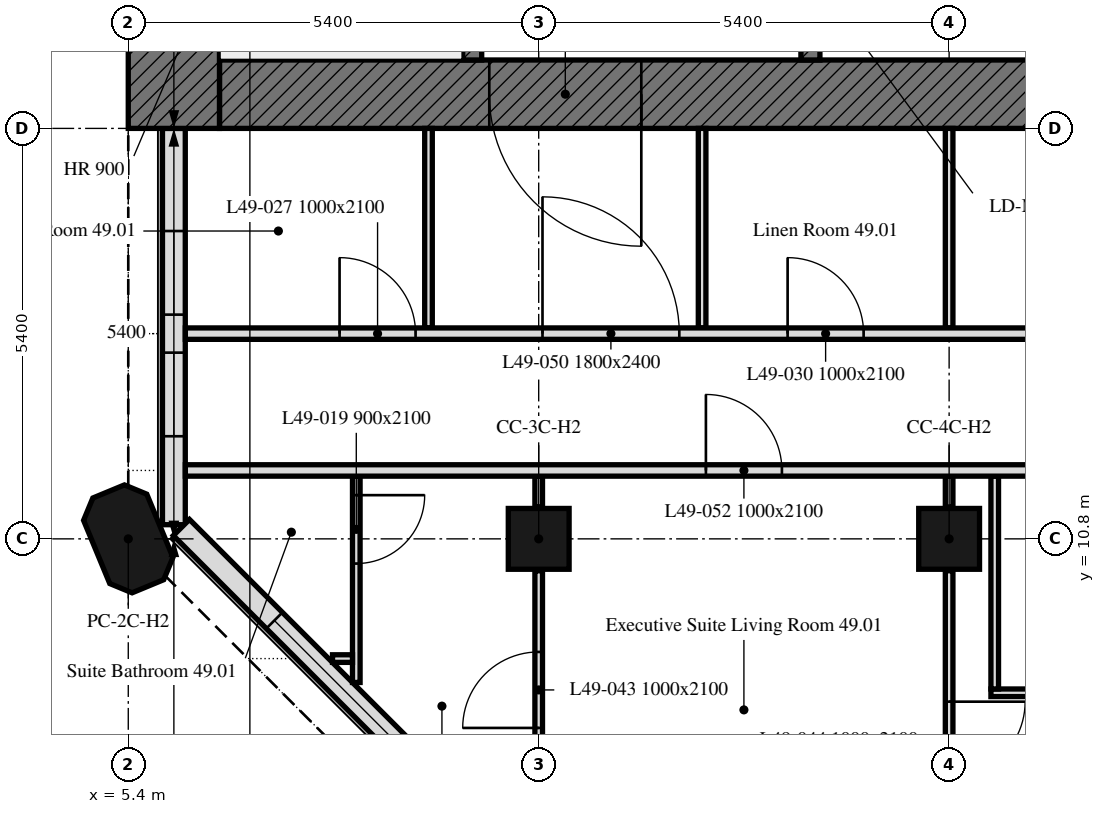
"""IFC4 building model, lengths in metres.
Left out: names, types, materials, properties, quantities, classifications, styles, units other than length and angle.
Written with IfcOpenShell. Run it as: python <this file> out.ifc"""

import sys

from ifc_helpers import new_model, si_unit, direction, frame, frame_2d, origin, origin_2d, place, context, subcontext, project, spatial, polyline, rectangle, outline, extrude, element, fill, save


model = new_model("IFC4")
c1 = context("Model", 3, precision=1e-05, world=origin(), true_north=direction((0.0, 1.0)))
c2 = subcontext(c1, "Body", "Model", "MODEL_VIEW")
j1 = project(units=[si_unit("LENGTHUNIT", "METRE"), si_unit("PLANEANGLEUNIT", "RADIAN")], contexts=[c1])
p1 = place(None, origin())
s1 = spatial("IfcSite", under=j1, at=p1, CompositionType="ELEMENT")
p2 = place(p1, origin())
s2 = spatial("IfcBuilding", under=s1, at=p2, CompositionType="ELEMENT")
p3 = place(p2, frame((0.0, 0.0, 200.5)))
s3 = spatial("IfcBuildingStorey", under=s2, at=p3, CompositionType="ELEMENT", Elevation=200.5)
p4 = place(p3, frame((5.4, 10.8, 0.0), z_axis=(0.0, 0.0, 1.0), x_axis=(-0.382683432365, 0.923879532511, 0.0)))
e1 = element("IfcColumn", 1, at=p4, inside=s3, PredefinedType="COLUMN", context=c2, shape_type="SweptSolid", body=[
    extrude(outline(polyline([(-0.45, -0.45), (0.45, -0.45), (0.675, -0.225), (0.675, 0.225), (0.45, 0.45), (-0.45, 0.45), (-0.675, 0.225), (-0.675, -0.225), (-0.45, -0.45)])), origin(), (0.0, 0.0, 1.0), 3.0),
])
for number, where, z_axis, x_axis in (
    (2, (10.8, 10.8, 0.0), (0.0, 0.0, 1.0), (1.0, 0.0, 0.0)),
    (3, (16.2, 10.8, 0.0), (0.0, 0.0, 1.0), (1.0, 0.0, 0.0)),
):
    element("IfcColumn", number, at=place(p3, frame(where, z_axis=z_axis, x_axis=x_axis)), inside=s3, PredefinedType="COLUMN", context=c2, shape_type="SweptSolid", body=[
        extrude(rectangle(XDim=0.8, YDim=0.8, at=origin_2d()), origin(), (0.0, 0.0, 1.0), 3.0),
    ])
p5 = place(p3, frame((6.0, 16.2, 0.0), z_axis=(0.0, 0.0, 1.0), x_axis=(0.0, -1.0, 0.0)))
e4 = element("IfcWall", 4, at=p5, inside=s3, PredefinedType="SOLIDWALL", context=c2, shape_type="SweptSolid", body=[
    extrude(rectangle(XDim=5.214, YDim=0.3, at=frame_2d((2.607, 0.0))), origin(), (0.0, 0.0, 1.0), 3.0),
])
p6 = place(p5, frame((1.35, 0.0, 0.9)))
e5 = element("IfcOpeningElement", 5, at=p6, cuts=e4, PredefinedType="OPENING", context=c2, shape_type="SweptSolid", body=[
    extrude(rectangle(XDim=1.1, YDim=1.7, at=frame_2d((0.55, 0.85))), frame((0.0, 0.16, 0.0), z_axis=(0.0, -1.0, 0.0), x_axis=(1.0, 0.0, 0.0)), (0.0, 0.0, 1.0), 0.32),
])
p7 = place(p5, frame((2.95, 0.0, 0.9)))
e6 = element("IfcOpeningElement", 6, at=p7, cuts=e4, PredefinedType="OPENING", context=c2, shape_type="SweptSolid", body=[
    extrude(rectangle(XDim=1.1, YDim=1.7, at=frame_2d((0.55, 0.85))), frame((0.0, 0.16, 0.0), z_axis=(0.0, -1.0, 0.0), x_axis=(1.0, 0.0, 0.0)), (0.0, 0.0, 1.0), 0.32),
])
p8 = place(p3, frame((6.099, 10.949, 0.0), z_axis=(0.0, 0.0, 1.0), x_axis=(0.707106781187, -0.707106781187, 0.0)))
e7 = element("IfcWall", 7, at=p8, inside=s3, PredefinedType="SOLIDWALL", context=c2, shape_type="SweptSolid", body=[
    extrude(rectangle(XDim=6.86, YDim=0.3, at=frame_2d((3.43, 0.0))), origin(), (0.0, 0.0, 1.0), 3.0),
])
p9 = place(p8, frame((1.73, 0.0, 0.9)))
e8 = element("IfcOpeningElement", 8, at=p9, cuts=e7, PredefinedType="OPENING", context=c2, shape_type="SweptSolid", body=[
    extrude(rectangle(XDim=3.4, YDim=1.7, at=frame_2d((1.7, 0.85))), frame((0.0, 0.16, 0.0), z_axis=(0.0, -1.0, 0.0), x_axis=(1.0, 0.0, 0.0)), (0.0, 0.0, 1.0), 0.32),
])
p10 = place(p3, frame((17.7, 16.65, 0.0), z_axis=(0.0, 0.0, 1.0), x_axis=(-1.0, 0.0, 0.0)))
e9 = element("IfcWall", 9, at=p10, inside=s3, PredefinedType="SOLIDWALL", context=c2, shape_type="SweptSolid", body=[
    extrude(rectangle(XDim=11.1, YDim=0.9, at=frame_2d((5.55, 0.0))), origin(), (0.0, 0.0, 1.0), 3.0),
])
p11 = place(p10, frame((5.55, 0.0, 0.0)))
e10 = element("IfcOpeningElement", 10, at=p11, cuts=e9, PredefinedType="OPENING", context=c2, shape_type="SweptSolid", body=[
    extrude(rectangle(XDim=2.0, YDim=2.4, at=frame_2d((1.0, 1.2))), frame((0.0, 0.45, 0.0), z_axis=(0.0, -1.0, 0.0), x_axis=(1.0, 0.0, 0.0)), (0.0, 0.0, 1.0), 0.9),
])
p12 = place(p3, frame((6.0, 16.2, 0.0), z_axis=(0.0, 0.0, 1.0), x_axis=(0.0, 1.0, 0.0)))
e11 = element("IfcWall", 11, at=p12, inside=s3, PredefinedType="SOLIDWALL", context=c2, shape_type="SweptSolid", body=[
    extrude(rectangle(XDim=16.2, YDim=1.2, at=frame_2d((8.1, 0.0))), origin(), (0.0, 0.0, 1.0), 3.0),
])
p13 = place(p3, frame((9.925, 17.1, 0.0), z_axis=(0.0, 0.0, 1.0), x_axis=(0.0, 1.0, 0.0)))
e12 = element("IfcWall", 12, at=p13, inside=s3, PredefinedType="SOLIDWALL", context=c2, shape_type="SweptSolid", body=[
    extrude(rectangle(XDim=14.4, YDim=0.25, at=frame_2d((7.2, 0.0))), origin(), (0.0, 0.0, 1.0), 3.0),
])
p14 = place(p13, frame((4.6, 0.0, 0.0)))
e13 = element("IfcOpeningElement", 13, at=p14, cuts=e12, PredefinedType="OPENING", context=c2, shape_type="SweptSolid", body=[
    extrude(rectangle(XDim=1.0, YDim=2.1, at=frame_2d((0.5, 1.05))), frame((0.0, 0.125, 0.0), z_axis=(0.0, -1.0, 0.0), x_axis=(1.0, 0.0, 0.0)), (0.0, 0.0, 1.0), 0.25),
])
p15 = place(p13, frame((7.062, 0.0, 0.0)))
e14 = element("IfcOpeningElement", 14, at=p15, cuts=e12, PredefinedType="OPENING", context=c2, shape_type="SweptSolid", body=[
    extrude(rectangle(XDim=1.2, YDim=2.1, at=frame_2d((0.6, 1.05))), frame((0.0, 0.125, 0.0), z_axis=(0.0, -1.0, 0.0), x_axis=(1.0, 0.0, 0.0)), (0.0, 0.0, 1.0), 0.25),
])
p16 = place(p13, frame((9.472, 0.0, 0.0)))
e15 = element("IfcOpeningElement", 15, at=p16, cuts=e12, PredefinedType="OPENING", context=c2, shape_type="SweptSolid", body=[
    extrude(rectangle(XDim=0.9, YDim=2.1, at=frame_2d((0.45, 1.05))), frame((0.0, 0.125, 0.0), z_axis=(0.0, -1.0, 0.0), x_axis=(1.0, 0.0, 0.0)), (0.0, 0.0, 1.0), 0.25),
])
p17 = place(p13, frame((10.779, 0.0, 0.0)))
e16 = element("IfcOpeningElement", 16, at=p17, cuts=e12, PredefinedType="OPENING", context=c2, shape_type="SweptSolid", body=[
    extrude(rectangle(XDim=0.9, YDim=2.1, at=frame_2d((0.45, 1.05))), frame((0.0, 0.125, 0.0), z_axis=(0.0, -1.0, 0.0), x_axis=(1.0, 0.0, 0.0)), (0.0, 0.0, 1.0), 0.25),
])
p18 = place(p13, frame((12.048, 0.0, 0.0)))
e17 = element("IfcOpeningElement", 17, at=p18, cuts=e12, PredefinedType="OPENING", context=c2, shape_type="SweptSolid", body=[
    extrude(rectangle(XDim=0.9, YDim=2.1, at=frame_2d((0.45, 1.05))), frame((0.0, 0.125, 0.0), z_axis=(0.0, -1.0, 0.0), x_axis=(1.0, 0.0, 0.0)), (0.0, 0.0, 1.0), 0.25),
])
p19 = place(p13, frame((13.354, 0.0, 0.0)))
e18 = element("IfcOpeningElement", 18, at=p19, cuts=e12, PredefinedType="OPENING", context=c2, shape_type="SweptSolid", body=[
    extrude(rectangle(XDim=0.9, YDim=2.1, at=frame_2d((0.45, 1.05))), frame((0.0, 0.125, 0.0), z_axis=(0.0, -1.0, 0.0), x_axis=(1.0, 0.0, 0.0)), (0.0, 0.0, 1.0), 0.25),
])
p20 = place(p3, frame((14.375, 17.1, 0.0), z_axis=(0.0, 0.0, 1.0), x_axis=(0.0, 1.0, 0.0)))
e19 = element("IfcWall", 19, at=p20, inside=s3, PredefinedType="SOLIDWALL", context=c2, shape_type="SweptSolid", body=[
    extrude(rectangle(XDim=14.4, YDim=0.25, at=frame_2d((7.2, 0.0))), origin(), (0.0, 0.0, 1.0), 3.0),
])
p21 = place(p20, frame((13.15, 0.0, 0.0)))
e20 = element("IfcOpeningElement", 20, at=p21, cuts=e19, PredefinedType="OPENING", context=c2, shape_type="SweptSolid", body=[
    extrude(rectangle(XDim=1.0, YDim=2.1, at=frame_2d((0.5, 1.05))), frame((0.0, 0.125, 0.0), z_axis=(0.0, -1.0, 0.0), x_axis=(1.0, 0.0, 0.0)), (0.0, 0.0, 1.0), 0.25),
])
p22 = place(p20, frame((0.6, 0.0, 0.0)))
e21 = element("IfcOpeningElement", 21, at=p22, cuts=e19, PredefinedType="OPENING", context=c2, shape_type="SweptSolid", body=[
    extrude(rectangle(XDim=1.1, YDim=2.1, at=frame_2d((0.55, 1.05))), frame((0.0, 0.125, 0.0), z_axis=(0.0, -1.0, 0.0), x_axis=(1.0, 0.0, 0.0)), (0.0, 0.0, 1.0), 0.25),
])
p23 = place(p20, frame((3.25, 0.0, 0.0)))
e22 = element("IfcOpeningElement", 22, at=p23, cuts=e19, PredefinedType="OPENING", context=c2, shape_type="SweptSolid", body=[
    extrude(rectangle(XDim=0.9, YDim=2.1, at=frame_2d((0.45, 1.05))), frame((0.0, 0.125, 0.0), z_axis=(0.0, -1.0, 0.0), x_axis=(1.0, 0.0, 0.0)), (0.0, 0.0, 1.0), 0.25),
])
p24 = place(p3, frame((10.8, 6.512, 0.0), z_axis=(0.0, 0.0, 1.0), x_axis=(0.0, 1.0, 0.0)))
e23 = element("IfcWall", 23, at=p24, inside=s3, PredefinedType="PARTITIONING", context=c2, shape_type="SweptSolid", body=[
    extrude(rectangle(XDim=3.868, YDim=0.1, at=frame_2d((1.934, 0.0))), origin(), (0.0, 0.0, 1.0), 3.0),
])
p25 = place(p24, frame((1.8, 0.0, 0.0)))
e24 = element("IfcOpeningElement", 24, at=p25, cuts=e23, PredefinedType="OPENING", context=c2, shape_type="SweptSolid", body=[
    extrude(rectangle(XDim=1.0, YDim=2.1, at=frame_2d((0.5, 1.05))), frame((0.0, 0.05, 0.0), z_axis=(0.0, -1.0, 0.0), x_axis=(1.0, 0.0, 0.0)), (0.0, 0.0, 1.0), 0.1),
])
p26 = place(p3, frame((10.8, 11.22, 0.0), z_axis=(0.0, 0.0, 1.0), x_axis=(0.0, 1.0, 0.0)))
e25 = element("IfcWall", 25, at=p26, inside=s3, PredefinedType="PARTITIONING", context=c2, shape_type="SweptSolid", body=[
    extrude(rectangle(XDim=0.405, YDim=0.1, at=frame_2d((0.203, 0.0))), origin(), (0.0, 0.0, 1.0), 3.0),
])
p27 = place(p3, frame((8.4, 11.625, 0.0), z_axis=(0.0, 0.0, 1.0), x_axis=(0.0, -1.0, 0.0)))
e26 = element("IfcWall", 26, at=p27, inside=s3, PredefinedType="PARTITIONING", context=c2, shape_type="SweptSolid", body=[
    extrude(rectangle(XDim=2.714, YDim=0.1, at=frame_2d((1.357, 0.0))), origin(), (0.0, 0.0, 1.0), 3.0),
])
p28 = place(p27, frame((0.25, 0.0, 0.0)))
e27 = element("IfcOpeningElement", 27, at=p28, cuts=e26, PredefinedType="OPENING", context=c2, shape_type="SweptSolid", body=[
    extrude(rectangle(XDim=0.9, YDim=2.1, at=frame_2d((0.45, 1.05))), frame((0.0, 0.05, 0.0), z_axis=(0.0, -1.0, 0.0), x_axis=(1.0, 0.0, 0.0)), (0.0, 0.0, 1.0), 0.1),
])
p29 = place(p3, frame((8.35, 9.225, 0.0), z_axis=(0.0, 0.0, 1.0), x_axis=(-1.0, 0.0, 0.0)))
e28 = element("IfcWall", 28, at=p29, inside=s3, PredefinedType="PARTITIONING", context=c2, shape_type="SweptSolid", body=[
    extrude(rectangle(XDim=0.263, YDim=0.1, at=frame_2d((0.131, 0.0))), origin(), (0.0, 0.0, 1.0), 3.0),
])
p30 = place(p3, frame((19.15, 8.775, 0.0), z_axis=(0.0, 0.0, 1.0), x_axis=(-1.0, 0.0, 0.0)))
e29 = element("IfcWall", 29, at=p30, inside=s3, PredefinedType="PARTITIONING", context=c2, shape_type="SweptSolid", body=[
    extrude(rectangle(XDim=2.4, YDim=0.1, at=frame_2d((1.2, 0.0))), origin(), (0.0, 0.0, 1.0), 3.0),
])
p31 = place(p3, frame((16.8, 8.825, 0.0), z_axis=(0.0, 0.0, 1.0), x_axis=(0.0, 1.0, 0.0)))
e30 = element("IfcWall", 30, at=p31, inside=s3, PredefinedType="PARTITIONING", context=c2, shape_type="SweptSolid", body=[
    extrude(rectangle(XDim=2.8, YDim=0.1, at=frame_2d((1.4, 0.0))), origin(), (0.0, 0.0, 1.0), 3.0),
])
p32 = place(p3, frame((16.2, 11.625, 0.0), z_axis=(0.0, 0.0, 1.0), x_axis=(0.0, -1.0, 0.0)))
e31 = element("IfcWall", 31, at=p32, inside=s3, PredefinedType="PARTITIONING", context=c2, shape_type="SweptSolid", body=[
    extrude(rectangle(XDim=0.405, YDim=0.1, at=frame_2d((0.203, 0.0))), origin(), (0.0, 0.0, 1.0), 3.0),
])
p33 = place(p3, frame((16.2, 10.38, 0.0), z_axis=(0.0, 0.0, 1.0), x_axis=(0.0, -1.0, 0.0)))
e32 = element("IfcWall", 32, at=p33, inside=s3, PredefinedType="PARTITIONING", context=c2, shape_type="SweptSolid", body=[
    extrude(rectangle(XDim=4.229, YDim=0.1, at=frame_2d((2.115, 0.0))), origin(), (0.0, 0.0, 1.0), 3.0),
])
p34 = place(p33, frame((1.722, 0.0, 0.0)))
e33 = element("IfcOpeningElement", 33, at=p34, cuts=e32, PredefinedType="OPENING", context=c2, shape_type="SweptSolid", body=[
    extrude(rectangle(XDim=1.0, YDim=2.1, at=frame_2d((0.5, 1.05))), frame((0.0, 0.05, 0.0), z_axis=(0.0, -1.0, 0.0), x_axis=(1.0, 0.0, 0.0)), (0.0, 0.0, 1.0), 0.1),
])
p35 = place(p3, frame((6.151, 11.7, 0.0), z_axis=(0.0, 0.0, 1.0), x_axis=(1.0, 0.0, 0.0)))
e34 = element("IfcWall", 34, at=p35, inside=s3, PredefinedType="PARTITIONING", context=c2, shape_type="SweptSolid", body=[
    extrude(rectangle(XDim=41.698, YDim=0.15, at=frame_2d((20.849, 0.0))), origin(), (0.0, 0.0, 1.0), 3.0),
])
p36 = place(p35, frame((37.954, 0.0, 0.0)))
e35 = element("IfcOpeningElement", 35, at=p36, cuts=e34, PredefinedType="OPENING", context=c2, shape_type="SweptSolid", body=[
    extrude(rectangle(XDim=1.0, YDim=2.1, at=frame_2d((0.5, 1.05))), frame((0.0, 0.075, 0.0), z_axis=(0.0, -1.0, 0.0), x_axis=(1.0, 0.0, 0.0)), (0.0, 0.0, 1.0), 0.15),
])
p37 = place(p35, frame((6.849, 0.0, 0.0)))
e36 = element("IfcOpeningElement", 36, at=p37, cuts=e34, PredefinedType="OPENING", context=c2, shape_type="SweptSolid", body=[
    extrude(rectangle(XDim=1.0, YDim=2.1, at=frame_2d((0.5, 1.05))), frame((0.0, 0.075, 0.0), z_axis=(0.0, -1.0, 0.0), x_axis=(1.0, 0.0, 0.0)), (0.0, 0.0, 1.0), 0.15),
])
p38 = place(p35, frame((23.049, 0.0, 0.0)))
e37 = element("IfcOpeningElement", 37, at=p38, cuts=e34, PredefinedType="OPENING", context=c2, shape_type="SweptSolid", body=[
    extrude(rectangle(XDim=1.0, YDim=2.1, at=frame_2d((0.5, 1.05))), frame((0.0, 0.075, 0.0), z_axis=(0.0, -1.0, 0.0), x_axis=(1.0, 0.0, 0.0)), (0.0, 0.0, 1.0), 0.15),
])
for number, where, z_axis, x_axis in (
    (38, (16.2, 16.2, 0.0), (0.0, 0.0, 1.0), (0.0, -1.0, 0.0)),
    (39, (9.35, 16.2, 0.0), (0.0, 0.0, 1.0), (0.0, -1.0, 0.0)),
    (40, (12.95, 13.575, 0.0), (0.0, 0.0, 1.0), (0.0, 1.0, 0.0)),
):
    element("IfcWall", number, at=place(p3, frame(where, z_axis=z_axis, x_axis=x_axis)), inside=s3, PredefinedType="PARTITIONING", context=c2, shape_type="SweptSolid", body=[
        extrude(rectangle(XDim=2.625, YDim=0.1, at=frame_2d((1.312, 0.0))), origin(), (0.0, 0.0, 1.0), 3.0),
    ])
p39 = place(p3, frame((6.151, 13.5, 0.0), z_axis=(0.0, 0.0, 1.0), x_axis=(1.0, 0.0, 0.0)))
e41 = element("IfcWall", 41, at=p39, inside=s3, PredefinedType="PARTITIONING", context=c2, shape_type="SweptSolid", body=[
    extrude(rectangle(XDim=36.974, YDim=0.15, at=frame_2d((18.487, 0.0))), origin(), (0.0, 0.0, 1.0), 3.0),
])
p40 = place(p39, frame((12.249, 0.0, 0.0)))
e42 = element("IfcOpeningElement", 42, at=p40, cuts=e41, PredefinedType="OPENING", context=c2, shape_type="SweptSolid", body=[
    extrude(rectangle(XDim=1.0, YDim=2.1, at=frame_2d((0.5, 1.05))), frame((0.0, 0.075, 0.0), z_axis=(0.0, -1.0, 0.0), x_axis=(1.0, 0.0, 0.0)), (0.0, 0.0, 1.0), 0.15),
])
p41 = place(p39, frame((18.816, 0.0, 0.0)))
e43 = element("IfcOpeningElement", 43, at=p41, cuts=e41, PredefinedType="OPENING", context=c2, shape_type="SweptSolid", body=[
    extrude(rectangle(XDim=1.0, YDim=2.1, at=frame_2d((0.5, 1.05))), frame((0.0, 0.075, 0.0), z_axis=(0.0, -1.0, 0.0), x_axis=(1.0, 0.0, 0.0)), (0.0, 0.0, 1.0), 0.15),
])
p42 = place(p39, frame((2.029, 0.0, 0.0)))
e44 = element("IfcOpeningElement", 44, at=p42, cuts=e41, PredefinedType="OPENING", context=c2, shape_type="SweptSolid", body=[
    extrude(rectangle(XDim=1.0, YDim=2.1, at=frame_2d((0.5, 1.05))), frame((0.0, 0.075, 0.0), z_axis=(0.0, -1.0, 0.0), x_axis=(1.0, 0.0, 0.0)), (0.0, 0.0, 1.0), 0.15),
])
p43 = place(p39, frame((27.374, 0.0, 0.0)))
e45 = element("IfcOpeningElement", 45, at=p43, cuts=e41, PredefinedType="OPENING", context=c2, shape_type="SweptSolid", body=[
    extrude(rectangle(XDim=1.0, YDim=2.1, at=frame_2d((0.5, 1.05))), frame((0.0, 0.075, 0.0), z_axis=(0.0, -1.0, 0.0), x_axis=(1.0, 0.0, 0.0)), (0.0, 0.0, 1.0), 0.15),
])
p44 = place(p39, frame((34.574, 0.0, 0.0)))
e46 = element("IfcOpeningElement", 46, at=p44, cuts=e41, PredefinedType="OPENING", context=c2, shape_type="SweptSolid", body=[
    extrude(rectangle(XDim=1.0, YDim=2.1, at=frame_2d((0.5, 1.05))), frame((0.0, 0.075, 0.0), z_axis=(0.0, -1.0, 0.0), x_axis=(1.0, 0.0, 0.0)), (0.0, 0.0, 1.0), 0.15),
])
p45 = place(p39, frame((7.924, 0.0, 0.0)))
e47 = element("IfcOpeningElement", 47, at=p45, cuts=e41, PredefinedType="OPENING", context=c2, shape_type="SweptSolid", body=[
    extrude(rectangle(XDim=1.0, YDim=2.1, at=frame_2d((0.5, 1.05))), frame((0.0, 0.075, 0.0), z_axis=(0.0, -1.0, 0.0), x_axis=(1.0, 0.0, 0.0)), (0.0, 0.0, 1.0), 0.15),
])
p46 = place(p39, frame((4.699, 0.0, 0.0)))
e48 = element("IfcOpeningElement", 48, at=p46, cuts=e41, PredefinedType="OPENING", context=c2, shape_type="SweptSolid", body=[
    extrude(rectangle(XDim=1.8, YDim=2.4, at=frame_2d((0.9, 1.2))), frame((0.0, 0.075, 0.0), z_axis=(0.0, -1.0, 0.0), x_axis=(1.0, 0.0, 0.0)), (0.0, 0.0, 1.0), 0.15),
])
p47 = place(p39, frame((29.799, 0.0, 0.0)))
e49 = element("IfcOpeningElement", 49, at=p47, cuts=e41, PredefinedType="OPENING", context=c2, shape_type="SweptSolid", body=[
    extrude(rectangle(XDim=1.8, YDim=2.4, at=frame_2d((0.9, 1.2))), frame((0.0, 0.075, 0.0), z_axis=(0.0, -1.0, 0.0), x_axis=(1.0, 0.0, 0.0)), (0.0, 0.0, 1.0), 0.15),
])
p48 = place(p6, origin())
e50 = element("IfcWindow", 50, at=p48, inside=s3, PartitioningType="SINGLE_PANEL", PredefinedType="WINDOW", context=c2, shape_type="SweptSolid", body=[
    extrude(rectangle(XDim=1.1, YDim=1.7, at=frame_2d((0.55, 0.85))), frame((0.0, 0.03, 0.0), z_axis=(0.0, -1.0, 0.0), x_axis=(1.0, 0.0, 0.0)), (0.0, 0.0, 1.0), 0.06),
])
fill(e5, e50)
p49 = place(p7, origin())
e51 = element("IfcWindow", 51, at=p49, inside=s3, PartitioningType="SINGLE_PANEL", PredefinedType="WINDOW", context=c2, shape_type="SweptSolid", body=[
    extrude(rectangle(XDim=1.1, YDim=1.7, at=frame_2d((0.55, 0.85))), frame((0.0, 0.03, 0.0), z_axis=(0.0, -1.0, 0.0), x_axis=(1.0, 0.0, 0.0)), (0.0, 0.0, 1.0), 0.06),
])
fill(e6, e51)
p50 = place(p9, origin())
e52 = element("IfcWindow", 52, at=p50, inside=s3, PartitioningType="SINGLE_PANEL", PredefinedType="WINDOW", context=c2, shape_type="SweptSolid", body=[
    extrude(rectangle(XDim=3.4, YDim=1.7, at=frame_2d((1.7, 0.85))), frame((0.0, 0.03, 0.0), z_axis=(0.0, -1.0, 0.0), x_axis=(1.0, 0.0, 0.0)), (0.0, 0.0, 1.0), 0.06),
])
fill(e8, e52)
p51 = place(p11, origin())
e53 = element("IfcDoor", 53, at=p51, inside=s3, OperationType="DOUBLE_DOOR_SINGLE_SWING", PredefinedType="DOOR", context=c2, shape_type="SweptSolid", body=[
    extrude(rectangle(XDim=2.0, YDim=2.4, at=frame_2d((1.0, 1.2))), frame((0.0, 0.025, 0.0), z_axis=(0.0, -1.0, 0.0), x_axis=(1.0, 0.0, 0.0)), (0.0, 0.0, 1.0), 0.05),
])
fill(e10, e53)
p52 = place(p28, origin())
e54 = element("IfcDoor", 54, at=p52, inside=s3, OperationType="SINGLE_SWING_LEFT", PredefinedType="DOOR", context=c2, shape_type="SweptSolid", body=[
    extrude(rectangle(XDim=0.9, YDim=2.1, at=frame_2d((0.45, 1.05))), frame((0.0, 0.025, 0.0), z_axis=(0.0, -1.0, 0.0), x_axis=(1.0, 0.0, 0.0)), (0.0, 0.0, 1.0), 0.05),
])
fill(e27, e54)
p53 = place(p42, origin())
e55 = element("IfcDoor", 55, at=p53, inside=s3, OperationType="SINGLE_SWING_LEFT", PredefinedType="DOOR", context=c2, shape_type="SweptSolid", body=[
    extrude(rectangle(XDim=1.0, YDim=2.1, at=frame_2d((0.5, 1.05))), frame((0.0, 0.025, 0.0), z_axis=(0.0, -1.0, 0.0), x_axis=(1.0, 0.0, 0.0)), (0.0, 0.0, 1.0), 0.05),
])
fill(e44, e55)
p54 = place(p45, origin())
e56 = element("IfcDoor", 56, at=p54, inside=s3, OperationType="SINGLE_SWING_RIGHT", PredefinedType="DOOR", context=c2, shape_type="SweptSolid", body=[
    extrude(rectangle(XDim=1.0, YDim=2.1, at=frame_2d((0.5, 1.05))), frame((0.0, 0.025, 0.0), z_axis=(0.0, -1.0, 0.0), x_axis=(1.0, 0.0, 0.0)), (0.0, 0.0, 1.0), 0.05),
])
fill(e47, e56)
p55 = place(p25, origin())
e57 = element("IfcDoor", 57, at=p55, inside=s3, OperationType="SINGLE_SWING_LEFT", PredefinedType="DOOR", context=c2, shape_type="SweptSolid", body=[
    extrude(rectangle(XDim=1.0, YDim=2.1, at=frame_2d((0.5, 1.05))), frame((0.0, 0.025, 0.0), z_axis=(0.0, -1.0, 0.0), x_axis=(1.0, 0.0, 0.0)), (0.0, 0.0, 1.0), 0.05),
])
fill(e24, e57)
p56 = place(p34, origin())
e58 = element("IfcDoor", 58, at=p56, inside=s3, OperationType="SINGLE_SWING_LEFT", PredefinedType="DOOR", context=c2, shape_type="SweptSolid", body=[
    extrude(rectangle(XDim=1.0, YDim=2.1, at=frame_2d((0.5, 1.05))), frame((0.0, 0.025, 0.0), z_axis=(0.0, -1.0, 0.0), x_axis=(1.0, 0.0, 0.0)), (0.0, 0.0, 1.0), 0.05),
])
fill(e33, e58)
p57 = place(p46, origin())
e59 = element("IfcDoor", 59, at=p57, inside=s3, OperationType="DOUBLE_DOOR_SINGLE_SWING", PredefinedType="DOOR", context=c2, shape_type="SweptSolid", body=[
    extrude(rectangle(XDim=1.8, YDim=2.4, at=frame_2d((0.9, 1.2))), frame((0.0, 0.025, 0.0), z_axis=(0.0, -1.0, 0.0), x_axis=(1.0, 0.0, 0.0)), (0.0, 0.0, 1.0), 0.05),
])
fill(e48, e59)
p58 = place(p37, origin())
e60 = element("IfcDoor", 60, at=p58, inside=s3, OperationType="SINGLE_SWING_RIGHT", PredefinedType="DOOR", context=c2, shape_type="SweptSolid", body=[
    extrude(rectangle(XDim=1.0, YDim=2.1, at=frame_2d((0.5, 1.05))), frame((0.0, 0.025, 0.0), z_axis=(0.0, -1.0, 0.0), x_axis=(1.0, 0.0, 0.0)), (0.0, 0.0, 1.0), 0.05),
])
fill(e36, e60)
save(model, sys.argv[1])
